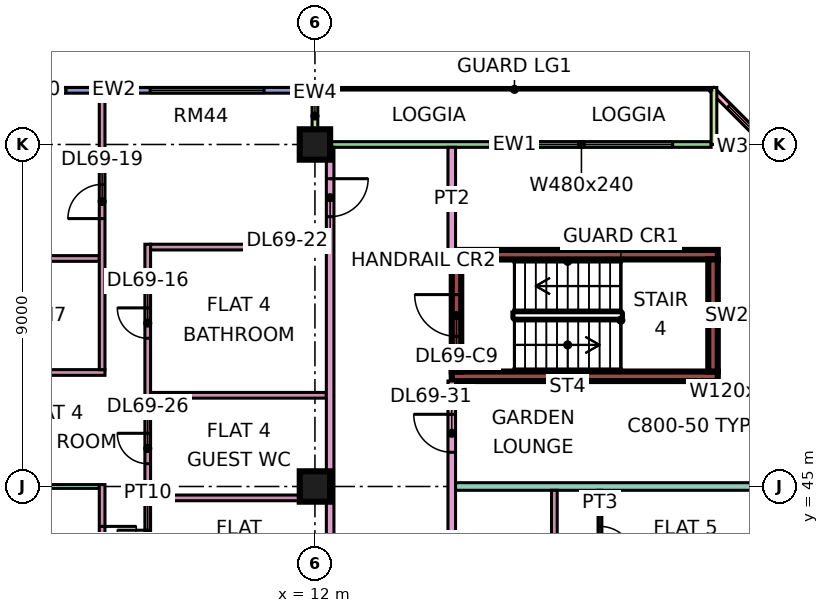
"""IFC4 building model, lengths in metres.
Left out: names, types, materials, properties, quantities, classifications, styles, units other than length and angle.
Written with IfcOpenShell. Run it as: python <this file> out.ifc"""

import sys

from ifc_helpers import new_model, si_unit, direction, frame, frame_2d, origin, origin_2d, place, context, subcontext, project, spatial, rectangle, extrude, element, fill, save


model = new_model("IFC4")
c1 = context("Model", 3, precision=1e-05, world=origin(), true_north=direction((0.0, 1.0)))
c2 = subcontext(c1, "Body", "Model", "MODEL_VIEW")
j1 = project(units=[si_unit("LENGTHUNIT", "METRE"), si_unit("PLANEANGLEUNIT", "RADIAN")], contexts=[c1])
p1 = place(None, origin())
s1 = spatial("IfcSite", under=j1, at=p1, CompositionType="ELEMENT")
p2 = place(p1, origin())
s2 = spatial("IfcBuilding", under=s1, at=p2, CompositionType="ELEMENT")
p3 = place(p2, frame((0.0, 0.0, 295.9)))
s3 = spatial("IfcBuildingStorey", under=s2, at=p3, CompositionType="ELEMENT", Elevation=295.9)
for number, where, z_axis, x_axis in (
    (1, (12.0, 45.0, 0.0), (0.0, 0.0, 1.0), (1.0, 0.0, 0.0)),
    (2, (12.0, 54.0, 0.0), (0.0, 0.0, 1.0), (1.0, 0.0, 0.0)),
):
    element("IfcColumn", number, at=place(p3, frame(where, z_axis=z_axis, x_axis=x_axis)), inside=s3, PredefinedType="COLUMN", context=c2, shape_type="SweptSolid", body=[
        extrude(rectangle(XDim=0.8, YDim=0.8, at=origin_2d()), origin(), (0.0, 0.0, 1.0), 3.75),
    ])
for number, where, z_axis, x_axis in (
    (3, (15.6, 47.9, 0.0), (0.0, 0.0, 1.0), (1.0, 0.0, 0.0)),
    (4, (15.6, 51.1, 0.0), (0.0, 0.0, 1.0), (1.0, 0.0, 0.0)),
):
    element("IfcWall", number, at=place(p3, frame(where, z_axis=z_axis, x_axis=x_axis)), inside=s3, PredefinedType="SHEAR", context=c2, shape_type="SweptSolid", body=[
        extrude(rectangle(XDim=7.0, YDim=0.25, at=frame_2d((3.5, 0.0))), origin(), (0.0, 0.0, 1.0), 3.75),
    ])
p4 = place(p3, frame((15.725, 48.025, 0.0), z_axis=(0.0, 0.0, 1.0), x_axis=(0.0, 1.0, 0.0)))
e5 = element("IfcWall", 5, at=p4, inside=s3, PredefinedType="SHEAR", context=c2, shape_type="SweptSolid", body=[
    extrude(rectangle(XDim=2.95, YDim=0.25, at=frame_2d((1.475, 0.0))), origin(), (0.0, 0.0, 1.0), 3.75),
])
p5 = place(p4, frame((0.925, 0.0, 0.0)))
e6 = element("IfcOpeningElement", 6, at=p5, cuts=e5, PredefinedType="OPENING", context=c2, shape_type="SweptSolid", body=[
    extrude(rectangle(XDim=1.1, YDim=2.2, at=frame_2d((0.55, 1.1))), frame((0.0, 0.135, 0.0), z_axis=(0.0, -1.0, 0.0), x_axis=(1.0, 0.0, 0.0)), (0.0, 0.0, 1.0), 0.27),
])
p6 = place(p3, frame((22.475, 48.025, 0.0), z_axis=(0.0, 0.0, 1.0), x_axis=(0.0, 1.0, 0.0)))
e7 = element("IfcWall", 7, at=p6, inside=s3, PredefinedType="SHEAR", context=c2, shape_type="SweptSolid", body=[
    extrude(rectangle(XDim=2.95, YDim=0.25, at=frame_2d((1.475, 0.0))), origin(), (0.0, 0.0, 1.0), 3.75),
])
p7 = place(p3, frame((25.447, 52.447, 0.0), z_axis=(0.0, 0.0, 1.0), x_axis=(-0.707106781187, 0.707106781187, 0.0)))
e8 = element("IfcWall", 8, at=p7, inside=s3, PredefinedType="SOLIDWALL", context=c2, shape_type="SweptSolid", body=[
    extrude(rectangle(XDim=4.243, YDim=0.15, at=frame_2d((2.121, 0.0))), origin(), (0.0, 0.0, 1.0), 3.35),
])
p8 = place(p7, frame((0.621, 0.0, 0.45)))
e9 = element("IfcOpeningElement", 9, at=p8, cuts=e8, PredefinedType="OPENING", context=c2, shape_type="SweptSolid", body=[
    extrude(rectangle(XDim=3.0, YDim=2.4, at=frame_2d((1.5, 1.2))), frame((0.0, 0.085, 0.0), z_axis=(0.0, -1.0, 0.0), x_axis=(1.0, 0.0, 0.0)), (0.0, 0.0, 1.0), 0.17),
])
p9 = place(p3, frame((22.425, 54.0, 0.0), z_axis=(0.0, 0.0, 1.0), x_axis=(-1.0, 0.0, 0.0)))
e10 = element("IfcWall", 10, at=p9, inside=s3, PredefinedType="SOLIDWALL", context=c2, shape_type="SweptSolid", body=[
    extrude(rectangle(XDim=10.35, YDim=0.15, at=frame_2d((5.175, 0.0))), origin(), (0.0, 0.0, 1.0), 3.35),
])
p10 = place(p9, frame((1.012, 0.0, 0.45)))
e11 = element("IfcOpeningElement", 11, at=p10, cuts=e10, PredefinedType="OPENING", context=c2, shape_type="SweptSolid", body=[
    extrude(rectangle(XDim=4.8, YDim=2.4, at=frame_2d((2.4, 1.2))), frame((0.0, 0.085, 0.0), z_axis=(0.0, -1.0, 0.0), x_axis=(1.0, 0.0, 0.0)), (0.0, 0.0, 1.0), 0.17),
])
for number, where, z_axis, x_axis in (
    (12, (22.5, 55.5, 0.0), (0.0, 0.0, 1.0), (0.0, -1.0, 0.0)),
    (13, (12.0, 55.5, 0.0), (0.0, 0.0, 1.0), (0.0, -1.0, 0.0)),
):
    element("IfcWall", number, at=place(p3, frame(where, z_axis=z_axis, x_axis=x_axis)), inside=s3, PredefinedType="SOLIDWALL", context=c2, shape_type="SweptSolid", body=[
        extrude(rectangle(XDim=1.5, YDim=0.15, at=frame_2d((0.75, 0.0))), origin(), (0.0, 0.0, 1.0), 3.35),
    ])
p11 = place(p3, frame((11.925, 55.425, 0.0), z_axis=(0.0, 0.0, 1.0), x_axis=(-1.0, 0.0, 0.0)))
e14 = element("IfcWall", 14, at=p11, inside=s3, PredefinedType="SOLIDWALL", context=c2, shape_type="SweptSolid", body=[
    extrude(rectangle(XDim=10.425, YDim=0.15, at=frame_2d((5.212, 0.0))), origin(), (0.0, 0.0, 1.0), 3.35),
])
p12 = place(p11, frame((1.262, 0.0, 0.45)))
e15 = element("IfcOpeningElement", 15, at=p12, cuts=e14, PredefinedType="OPENING", context=c2, shape_type="SweptSolid", body=[
    extrude(rectangle(XDim=3.0, YDim=2.4, at=frame_2d((1.5, 1.2))), frame((0.0, 0.085, 0.0), z_axis=(0.0, -1.0, 0.0), x_axis=(1.0, 0.0, 0.0)), (0.0, 0.0, 1.0), 0.17),
])
p13 = place(p11, frame((6.475, 0.0, 0.45)))
e16 = element("IfcOpeningElement", 16, at=p13, cuts=e14, PredefinedType="OPENING", context=c2, shape_type="SweptSolid", body=[
    extrude(rectangle(XDim=3.0, YDim=2.4, at=frame_2d((1.5, 1.2))), frame((0.0, 0.085, 0.0), z_axis=(0.0, -1.0, 0.0), x_axis=(1.0, 0.0, 0.0)), (0.0, 0.0, 1.0), 0.17),
])
p14 = place(p3, frame((0.0, 48.0, 0.0), z_axis=(0.0, 0.0, 1.0), x_axis=(1.0, 0.0, 0.0)))
e17 = element("IfcWall", 17, at=p14, inside=s3, PredefinedType="PARTITIONING", context=c2, shape_type="SweptSolid", body=[
    extrude(rectangle(XDim=6.475, YDim=0.15, at=frame_2d((3.238, 0.0))), origin(), (0.0, 0.0, 1.0), 3.35),
])
p15 = place(p3, frame((0.074, 45.0, 0.0), z_axis=(0.0, 0.0, 1.0), x_axis=(1.0, 0.0, 0.0)))
e18 = element("IfcWall", 18, at=p15, inside=s3, PredefinedType="PARTITIONING", context=c2, shape_type="SweptSolid", body=[
    extrude(rectangle(XDim=6.251, YDim=0.1, at=frame_2d((3.125, 0.0))), origin(), (0.0, 0.0, 1.0), 3.35),
])
p16 = place(p3, frame((3.325, 51.0, 0.0), z_axis=(0.0, 0.0, 1.0), x_axis=(1.0, 0.0, 0.0)))
e19 = element("IfcWall", 19, at=p16, inside=s3, PredefinedType="PARTITIONING", context=c2, shape_type="SweptSolid", body=[
    extrude(rectangle(XDim=3.0, YDim=0.15, at=frame_2d((1.5, 0.0))), origin(), (0.0, 0.0, 1.0), 3.35),
])
p17 = place(p3, frame((6.4, 36.1, 0.0), z_axis=(0.0, 0.0, 1.0), x_axis=(0.0, 1.0, 0.0)))
e20 = element("IfcWall", 20, at=p17, inside=s3, PredefinedType="PARTITIONING", context=c2, shape_type="SweptSolid", body=[
    extrude(rectangle(XDim=8.95, YDim=0.15, at=frame_2d((4.475, 0.0))), origin(), (0.0, 0.0, 1.0), 3.35),
])
p18 = place(p17, frame((0.95, 0.0, 0.0)))
e21 = element("IfcOpeningElement", 21, at=p18, cuts=e20, PredefinedType="OPENING", context=c2, shape_type="SweptSolid", body=[
    extrude(rectangle(XDim=0.9, YDim=2.1, at=frame_2d((0.45, 1.05))), frame((0.0, 0.085, 0.0), z_axis=(0.0, -1.0, 0.0), x_axis=(1.0, 0.0, 0.0)), (0.0, 0.0, 1.0), 0.17),
])
p19 = place(p17, frame((6.95, 0.0, 0.0)))
e22 = element("IfcOpeningElement", 22, at=p19, cuts=e20, PredefinedType="OPENING", context=c2, shape_type="SweptSolid", body=[
    extrude(rectangle(XDim=0.9, YDim=2.1, at=frame_2d((0.45, 1.05))), frame((0.0, 0.085, 0.0), z_axis=(0.0, -1.0, 0.0), x_axis=(1.0, 0.0, 0.0)), (0.0, 0.0, 1.0), 0.17),
])
p20 = place(p17, frame((4.8, 0.0, 0.0)))
e23 = element("IfcOpeningElement", 23, at=p20, cuts=e20, PredefinedType="OPENING", context=c2, shape_type="SweptSolid", body=[
    extrude(rectangle(XDim=0.8, YDim=2.1, at=frame_2d((0.4, 1.05))), frame((0.0, 0.085, 0.0), z_axis=(0.0, -1.0, 0.0), x_axis=(1.0, 0.0, 0.0)), (0.0, 0.0, 1.0), 0.17),
])
p21 = place(p3, frame((6.4, 48.075, 0.0), z_axis=(0.0, 0.0, 1.0), x_axis=(0.0, 1.0, 0.0)))
e24 = element("IfcWall", 24, at=p21, inside=s3, PredefinedType="PARTITIONING", context=c2, shape_type="SweptSolid", body=[
    extrude(rectangle(XDim=7.275, YDim=0.15, at=frame_2d((3.638, 0.0))), origin(), (0.0, 0.0, 1.0), 3.35),
])
p22 = place(p21, frame((3.975, 0.0, 0.0)))
e25 = element("IfcOpeningElement", 25, at=p22, cuts=e24, PredefinedType="OPENING", context=c2, shape_type="SweptSolid", body=[
    extrude(rectangle(XDim=0.9, YDim=2.1, at=frame_2d((0.45, 1.05))), frame((0.0, 0.085, 0.0), z_axis=(0.0, -1.0, 0.0), x_axis=(1.0, 0.0, 0.0)), (0.0, 0.0, 1.0), 0.17),
])
p23 = place(p3, frame((7.6, 36.1, 0.0), z_axis=(0.0, 0.0, 1.0), x_axis=(0.0, 1.0, 0.0)))
e26 = element("IfcWall", 26, at=p23, inside=s3, PredefinedType="PARTITIONING", context=c2, shape_type="SweptSolid", body=[
    extrude(rectangle(XDim=15.275, YDim=0.15, at=frame_2d((7.637, 0.0))), origin(), (0.0, 0.0, 1.0), 3.35),
])
p24 = place(p23, frame((12.8, 0.0, 0.0)))
e27 = element("IfcOpeningElement", 27, at=p24, cuts=e26, PredefinedType="OPENING", context=c2, shape_type="SweptSolid", body=[
    extrude(rectangle(XDim=0.8, YDim=2.1, at=frame_2d((0.4, 1.05))), frame((0.0, 0.085, 0.0), z_axis=(0.0, -1.0, 0.0), x_axis=(1.0, 0.0, 0.0)), (0.0, 0.0, 1.0), 0.17),
])
p25 = place(p23, frame((2.6, 0.0, 0.0)))
e28 = element("IfcOpeningElement", 28, at=p25, cuts=e26, PredefinedType="OPENING", context=c2, shape_type="SweptSolid", body=[
    extrude(rectangle(XDim=0.9, YDim=2.1, at=frame_2d((0.45, 1.05))), frame((0.0, 0.085, 0.0), z_axis=(0.0, -1.0, 0.0), x_axis=(1.0, 0.0, 0.0)), (0.0, 0.0, 1.0), 0.17),
])
p26 = place(p23, frame((6.95, 0.0, 0.0)))
e29 = element("IfcOpeningElement", 29, at=p26, cuts=e26, PredefinedType="OPENING", context=c2, shape_type="SweptSolid", body=[
    extrude(rectangle(XDim=0.8, YDim=2.1, at=frame_2d((0.4, 1.05))), frame((0.0, 0.085, 0.0), z_axis=(0.0, -1.0, 0.0), x_axis=(1.0, 0.0, 0.0)), (0.0, 0.0, 1.0), 0.17),
])
p27 = place(p23, frame((9.5, 0.0, 0.0)))
e30 = element("IfcOpeningElement", 30, at=p27, cuts=e26, PredefinedType="OPENING", context=c2, shape_type="SweptSolid", body=[
    extrude(rectangle(XDim=0.8, YDim=2.1, at=frame_2d((0.4, 1.05))), frame((0.0, 0.085, 0.0), z_axis=(0.0, -1.0, 0.0), x_axis=(1.0, 0.0, 0.0)), (0.0, 0.0, 1.0), 0.17),
])
for number, where, z_axis, x_axis in (
    (31, (7.675, 44.7, 0.0), (0.0, 0.0, 1.0), (1.0, 0.0, 0.0)),
    (32, (7.675, 47.4, 0.0), (0.0, 0.0, 1.0), (1.0, 0.0, 0.0)),
    (33, (7.675, 51.3, 0.0), (0.0, 0.0, 1.0), (1.0, 0.0, 0.0)),
):
    element("IfcWall", number, at=place(p3, frame(where, z_axis=z_axis, x_axis=x_axis)), inside=s3, PredefinedType="PARTITIONING", context=c2, shape_type="SweptSolid", body=[
        extrude(rectangle(XDim=4.625, YDim=0.15, at=frame_2d((2.312, 0.0))), origin(), (0.0, 0.0, 1.0), 3.35),
    ])
p28 = place(p3, frame((12.4, 20.0, 0.0), z_axis=(0.0, 0.0, 1.0), x_axis=(0.0, 1.0, 0.0)))
e34 = element("IfcWall", 34, at=p28, inside=s3, PredefinedType="PARTITIONING", context=c2, shape_type="SweptSolid", body=[
    extrude(rectangle(XDim=33.926, YDim=0.2, at=frame_2d((16.963, 0.0))), origin(), (0.0, 0.0, 1.0), 3.35),
])
p29 = place(p28, frame((32.1, 0.0, 0.0)))
e35 = element("IfcOpeningElement", 35, at=p29, cuts=e34, PredefinedType="OPENING", context=c2, shape_type="SweptSolid", body=[
    extrude(rectangle(XDim=1.0, YDim=2.1, at=frame_2d((0.5, 1.05))), frame((0.0, 0.11, 0.0), z_axis=(0.0, -1.0, 0.0), x_axis=(1.0, 0.0, 0.0)), (0.0, 0.0, 1.0), 0.22),
])
p30 = place(p28, frame((0.6, 0.0, 0.0)))
e36 = element("IfcOpeningElement", 36, at=p30, cuts=e34, PredefinedType="OPENING", context=c2, shape_type="SweptSolid", body=[
    extrude(rectangle(XDim=1.2, YDim=2.1, at=frame_2d((0.6, 1.05))), frame((0.0, 0.11, 0.0), z_axis=(0.0, -1.0, 0.0), x_axis=(1.0, 0.0, 0.0)), (0.0, 0.0, 1.0), 0.22),
])
p31 = place(p28, frame((14.1, 0.0, 0.0)))
e37 = element("IfcOpeningElement", 37, at=p31, cuts=e34, PredefinedType="OPENING", context=c2, shape_type="SweptSolid", body=[
    extrude(rectangle(XDim=1.0, YDim=2.1, at=frame_2d((0.5, 1.05))), frame((0.0, 0.11, 0.0), z_axis=(0.0, -1.0, 0.0), x_axis=(1.0, 0.0, 0.0)), (0.0, 0.0, 1.0), 0.22),
])
p32 = place(p3, frame((15.6, 20.0, 0.0), z_axis=(0.0, 0.0, 1.0), x_axis=(0.0, 1.0, 0.0)))
e38 = element("IfcWall", 38, at=p32, inside=s3, PredefinedType="PARTITIONING", context=c2, shape_type="SweptSolid", body=[
    extrude(rectangle(XDim=27.775, YDim=0.2, at=frame_2d((13.887, 0.0))), origin(), (0.0, 0.0, 1.0), 3.35),
])
p33 = place(p32, frame((6.55, 0.0, 0.0)))
e39 = element("IfcOpeningElement", 39, at=p33, cuts=e38, PredefinedType="OPENING", context=c2, shape_type="SweptSolid", body=[
    extrude(rectangle(XDim=1.0, YDim=2.1, at=frame_2d((0.5, 1.05))), frame((0.0, 0.11, 0.0), z_axis=(0.0, -1.0, 0.0), x_axis=(1.0, 0.0, 0.0)), (0.0, 0.0, 1.0), 0.22),
])
p34 = place(p32, frame((12.25, 0.0, 0.0)))
e40 = element("IfcOpeningElement", 40, at=p34, cuts=e38, PredefinedType="OPENING", context=c2, shape_type="SweptSolid", body=[
    extrude(rectangle(XDim=1.6, YDim=2.1, at=frame_2d((0.8, 1.05))), frame((0.0, 0.11, 0.0), z_axis=(0.0, -1.0, 0.0), x_axis=(1.0, 0.0, 0.0)), (0.0, 0.0, 1.0), 0.22),
])
p35 = place(p32, frame((17.2, 0.0, 0.0)))
e41 = element("IfcOpeningElement", 41, at=p35, cuts=e38, PredefinedType="OPENING", context=c2, shape_type="SweptSolid", body=[
    extrude(rectangle(XDim=1.0, YDim=2.1, at=frame_2d((0.5, 1.05))), frame((0.0, 0.11, 0.0), z_axis=(0.0, -1.0, 0.0), x_axis=(1.0, 0.0, 0.0)), (0.0, 0.0, 1.0), 0.22),
])
p36 = place(p32, frame((1.15, 0.0, 0.0)))
e42 = element("IfcOpeningElement", 42, at=p36, cuts=e38, PredefinedType="OPENING", context=c2, shape_type="SweptSolid", body=[
    extrude(rectangle(XDim=1.8, YDim=2.1, at=frame_2d((0.9, 1.05))), frame((0.0, 0.11, 0.0), z_axis=(0.0, -1.0, 0.0), x_axis=(1.0, 0.0, 0.0)), (0.0, 0.0, 1.0), 0.22),
])
p37 = place(p32, frame((25.9, 0.0, 0.0)))
e43 = element("IfcOpeningElement", 43, at=p37, cuts=e38, PredefinedType="OPENING", context=c2, shape_type="SweptSolid", body=[
    extrude(rectangle(XDim=1.0, YDim=2.1, at=frame_2d((0.5, 1.05))), frame((0.0, 0.11, 0.0), z_axis=(0.0, -1.0, 0.0), x_axis=(1.0, 0.0, 0.0)), (0.0, 0.0, 1.0), 0.22),
])
p38 = place(p3, frame((15.6, 51.225, 0.0), z_axis=(0.0, 0.0, 1.0), x_axis=(0.0, 1.0, 0.0)))
e44 = element("IfcWall", 44, at=p38, inside=s3, PredefinedType="PARTITIONING", context=c2, shape_type="SweptSolid", body=[
    extrude(rectangle(XDim=2.701, YDim=0.2, at=frame_2d((1.351, 0.0))), origin(), (0.0, 0.0, 1.0), 3.35),
])
p39 = place(p3, frame((15.7, 45.0, 0.0), z_axis=(0.0, 0.0, 1.0), x_axis=(1.0, 0.0, 0.0)))
e45 = element("IfcWall", 45, at=p39, inside=s3, PredefinedType="PARTITIONING", context=c2, shape_type="SweptSolid", body=[
    extrude(rectangle(XDim=8.226, YDim=0.2, at=frame_2d((4.113, 0.0))), origin(), (0.0, 0.0, 1.0), 3.35),
])
p40 = place(p3, frame((18.3, 39.225, 0.0), z_axis=(0.0, 0.0, 1.0), x_axis=(0.0, 1.0, 0.0)))
e46 = element("IfcWall", 46, at=p40, inside=s3, PredefinedType="PARTITIONING", context=c2, shape_type="SweptSolid", body=[
    extrude(rectangle(XDim=5.675, YDim=0.15, at=frame_2d((2.837, 0.0))), origin(), (0.0, 0.0, 1.0), 3.35),
])
p41 = place(p40, frame((0.775, 0.0, 0.0)))
e47 = element("IfcOpeningElement", 47, at=p41, cuts=e46, PredefinedType="OPENING", context=c2, shape_type="SweptSolid", body=[
    extrude(rectangle(XDim=0.8, YDim=2.1, at=frame_2d((0.4, 1.05))), frame((0.0, 0.085, 0.0), z_axis=(0.0, -1.0, 0.0), x_axis=(1.0, 0.0, 0.0)), (0.0, 0.0, 1.0), 0.17),
])
p42 = place(p40, frame((3.525, 0.0, 0.0)))
e48 = element("IfcOpeningElement", 48, at=p42, cuts=e46, PredefinedType="OPENING", context=c2, shape_type="SweptSolid", body=[
    extrude(rectangle(XDim=0.9, YDim=2.1, at=frame_2d((0.45, 1.05))), frame((0.0, 0.085, 0.0), z_axis=(0.0, -1.0, 0.0), x_axis=(1.0, 0.0, 0.0)), (0.0, 0.0, 1.0), 0.17),
])
p43 = place(p3, frame((19.5, 42.05, 0.0), z_axis=(0.0, 0.0, 1.0), x_axis=(0.0, 1.0, 0.0)))
e49 = element("IfcWall", 49, at=p43, inside=s3, PredefinedType="PARTITIONING", context=c2, shape_type="SweptSolid", body=[
    extrude(rectangle(XDim=2.85, YDim=0.1, at=frame_2d((1.425, 0.0))), origin(), (0.0, 0.0, 1.0), 3.35),
])
p44 = place(p43, frame((1.0, 0.0, 0.0)))
e50 = element("IfcOpeningElement", 50, at=p44, cuts=e49, PredefinedType="OPENING", context=c2, shape_type="SweptSolid", body=[
    extrude(rectangle(XDim=0.9, YDim=2.1, at=frame_2d((0.45, 1.05))), frame((0.0, 0.06, 0.0), z_axis=(0.0, -1.0, 0.0), x_axis=(1.0, 0.0, 0.0)), (0.0, 0.0, 1.0), 0.12),
])
p45 = place(p8, origin())
e51 = element("IfcWindow", 51, at=p45, inside=s3, PartitioningType="SINGLE_PANEL", PredefinedType="WINDOW", context=c2, shape_type="SweptSolid", body=[
    extrude(rectangle(XDim=3.0, YDim=2.4, at=frame_2d((1.5, 1.2))), frame((0.0, 0.03, 0.0), z_axis=(0.0, -1.0, 0.0), x_axis=(1.0, 0.0, 0.0)), (0.0, 0.0, 1.0), 0.06),
])
fill(e9, e51)
p46 = place(p10, origin())
e52 = element("IfcWindow", 52, at=p46, inside=s3, PartitioningType="SINGLE_PANEL", PredefinedType="WINDOW", context=c2, shape_type="SweptSolid", body=[
    extrude(rectangle(XDim=4.8, YDim=2.4, at=frame_2d((2.4, 1.2))), frame((0.0, 0.03, 0.0), z_axis=(0.0, -1.0, 0.0), x_axis=(1.0, 0.0, 0.0)), (0.0, 0.0, 1.0), 0.06),
])
fill(e11, e52)
p47 = place(p12, origin())
e53 = element("IfcWindow", 53, at=p47, inside=s3, PartitioningType="SINGLE_PANEL", PredefinedType="WINDOW", context=c2, shape_type="SweptSolid", body=[
    extrude(rectangle(XDim=3.0, YDim=2.4, at=frame_2d((1.5, 1.2))), frame((0.0, 0.03, 0.0), z_axis=(0.0, -1.0, 0.0), x_axis=(1.0, 0.0, 0.0)), (0.0, 0.0, 1.0), 0.06),
])
fill(e15, e53)
p48 = place(p13, origin())
e54 = element("IfcWindow", 54, at=p48, inside=s3, PartitioningType="SINGLE_PANEL", PredefinedType="WINDOW", context=c2, shape_type="SweptSolid", body=[
    extrude(rectangle(XDim=3.0, YDim=2.4, at=frame_2d((1.5, 1.2))), frame((0.0, 0.03, 0.0), z_axis=(0.0, -1.0, 0.0), x_axis=(1.0, 0.0, 0.0)), (0.0, 0.0, 1.0), 0.06),
])
fill(e16, e54)
p49 = place(p5, frame((1.1, 0.0, 0.0), z_axis=(0.0, 0.0, 1.0), x_axis=(-1.0, 0.0, 0.0)))
e55 = element("IfcDoor", 55, at=p49, inside=s3, OperationType="SINGLE_SWING_RIGHT", PredefinedType="DOOR", context=c2, shape_type="SweptSolid", body=[
    extrude(rectangle(XDim=1.1, YDim=2.2, at=frame_2d((0.55, 1.1))), frame((0.0, 0.025, 0.0), z_axis=(0.0, -1.0, 0.0), x_axis=(1.0, 0.0, 0.0)), (0.0, 0.0, 1.0), 0.05),
])
fill(e6, e55)
p50 = place(p44, frame((0.9, 0.0, 0.0), z_axis=(0.0, 0.0, 1.0), x_axis=(-1.0, 0.0, 0.0)))
e56 = element("IfcDoor", 56, at=p50, inside=s3, OperationType="SINGLE_SWING_LEFT", PredefinedType="DOOR", context=c2, shape_type="SweptSolid", body=[
    extrude(rectangle(XDim=0.9, YDim=2.1, at=frame_2d((0.45, 1.05))), frame((0.0, 0.025, 0.0), z_axis=(0.0, -1.0, 0.0), x_axis=(1.0, 0.0, 0.0)), (0.0, 0.0, 1.0), 0.05),
])
fill(e50, e56)
p51 = place(p24, frame((0.8, 0.0, 0.0), z_axis=(0.0, 0.0, 1.0), x_axis=(-1.0, 0.0, 0.0)))
e57 = element("IfcDoor", 57, at=p51, inside=s3, OperationType="SINGLE_SWING_RIGHT", PredefinedType="DOOR", context=c2, shape_type="SweptSolid", body=[
    extrude(rectangle(XDim=0.8, YDim=2.1, at=frame_2d((0.4, 1.05))), frame((0.0, 0.025, 0.0), z_axis=(0.0, -1.0, 0.0), x_axis=(1.0, 0.0, 0.0)), (0.0, 0.0, 1.0), 0.05),
])
fill(e27, e57)
p52 = place(p19, origin())
e58 = element("IfcDoor", 58, at=p52, inside=s3, OperationType="SINGLE_SWING_RIGHT", PredefinedType="DOOR", context=c2, shape_type="SweptSolid", body=[
    extrude(rectangle(XDim=0.9, YDim=2.1, at=frame_2d((0.45, 1.05))), frame((0.0, 0.025, 0.0), z_axis=(0.0, -1.0, 0.0), x_axis=(1.0, 0.0, 0.0)), (0.0, 0.0, 1.0), 0.05),
])
fill(e22, e58)
p53 = place(p22, origin())
e59 = element("IfcDoor", 59, at=p53, inside=s3, OperationType="SINGLE_SWING_LEFT", PredefinedType="DOOR", context=c2, shape_type="SweptSolid", body=[
    extrude(rectangle(XDim=0.9, YDim=2.1, at=frame_2d((0.45, 1.05))), frame((0.0, 0.025, 0.0), z_axis=(0.0, -1.0, 0.0), x_axis=(1.0, 0.0, 0.0)), (0.0, 0.0, 1.0), 0.05),
])
fill(e25, e59)
p54 = place(p29, origin())
e60 = element("IfcDoor", 60, at=p54, inside=s3, OperationType="SINGLE_SWING_RIGHT", PredefinedType="DOOR", context=c2, shape_type="SweptSolid", body=[
    extrude(rectangle(XDim=1.0, YDim=2.1, at=frame_2d((0.5, 1.05))), frame((0.0, 0.025, 0.0), z_axis=(0.0, -1.0, 0.0), x_axis=(1.0, 0.0, 0.0)), (0.0, 0.0, 1.0), 0.05),
])
fill(e35, e60)
p55 = place(p26, frame((0.8, 0.0, 0.0), z_axis=(0.0, 0.0, 1.0), x_axis=(-1.0, 0.0, 0.0)))
e61 = element("IfcDoor", 61, at=p55, inside=s3, OperationType="SINGLE_SWING_RIGHT", PredefinedType="DOOR", context=c2, shape_type="SweptSolid", body=[
    extrude(rectangle(XDim=0.8, YDim=2.1, at=frame_2d((0.4, 1.05))), frame((0.0, 0.025, 0.0), z_axis=(0.0, -1.0, 0.0), x_axis=(1.0, 0.0, 0.0)), (0.0, 0.0, 1.0), 0.05),
])
fill(e29, e61)
p56 = place(p27, frame((0.8, 0.0, 0.0), z_axis=(0.0, 0.0, 1.0), x_axis=(-1.0, 0.0, 0.0)))
e62 = element("IfcDoor", 62, at=p56, inside=s3, OperationType="SINGLE_SWING_RIGHT", PredefinedType="DOOR", context=c2, shape_type="SweptSolid", body=[
    extrude(rectangle(XDim=0.8, YDim=2.1, at=frame_2d((0.4, 1.05))), frame((0.0, 0.025, 0.0), z_axis=(0.0, -1.0, 0.0), x_axis=(1.0, 0.0, 0.0)), (0.0, 0.0, 1.0), 0.05),
])
fill(e30, e62)
p57 = place(p37, frame((1.0, 0.0, 0.0), z_axis=(0.0, 0.0, 1.0), x_axis=(-1.0, 0.0, 0.0)))
e63 = element("IfcDoor", 63, at=p57, inside=s3, OperationType="SINGLE_SWING_RIGHT", PredefinedType="DOOR", context=c2, shape_type="SweptSolid", body=[
    extrude(rectangle(XDim=1.0, YDim=2.1, at=frame_2d((0.5, 1.05))), frame((0.0, 0.025, 0.0), z_axis=(0.0, -1.0, 0.0), x_axis=(1.0, 0.0, 0.0)), (0.0, 0.0, 1.0), 0.05),
])
fill(e43, e63)
save(model, sys.argv[1])
